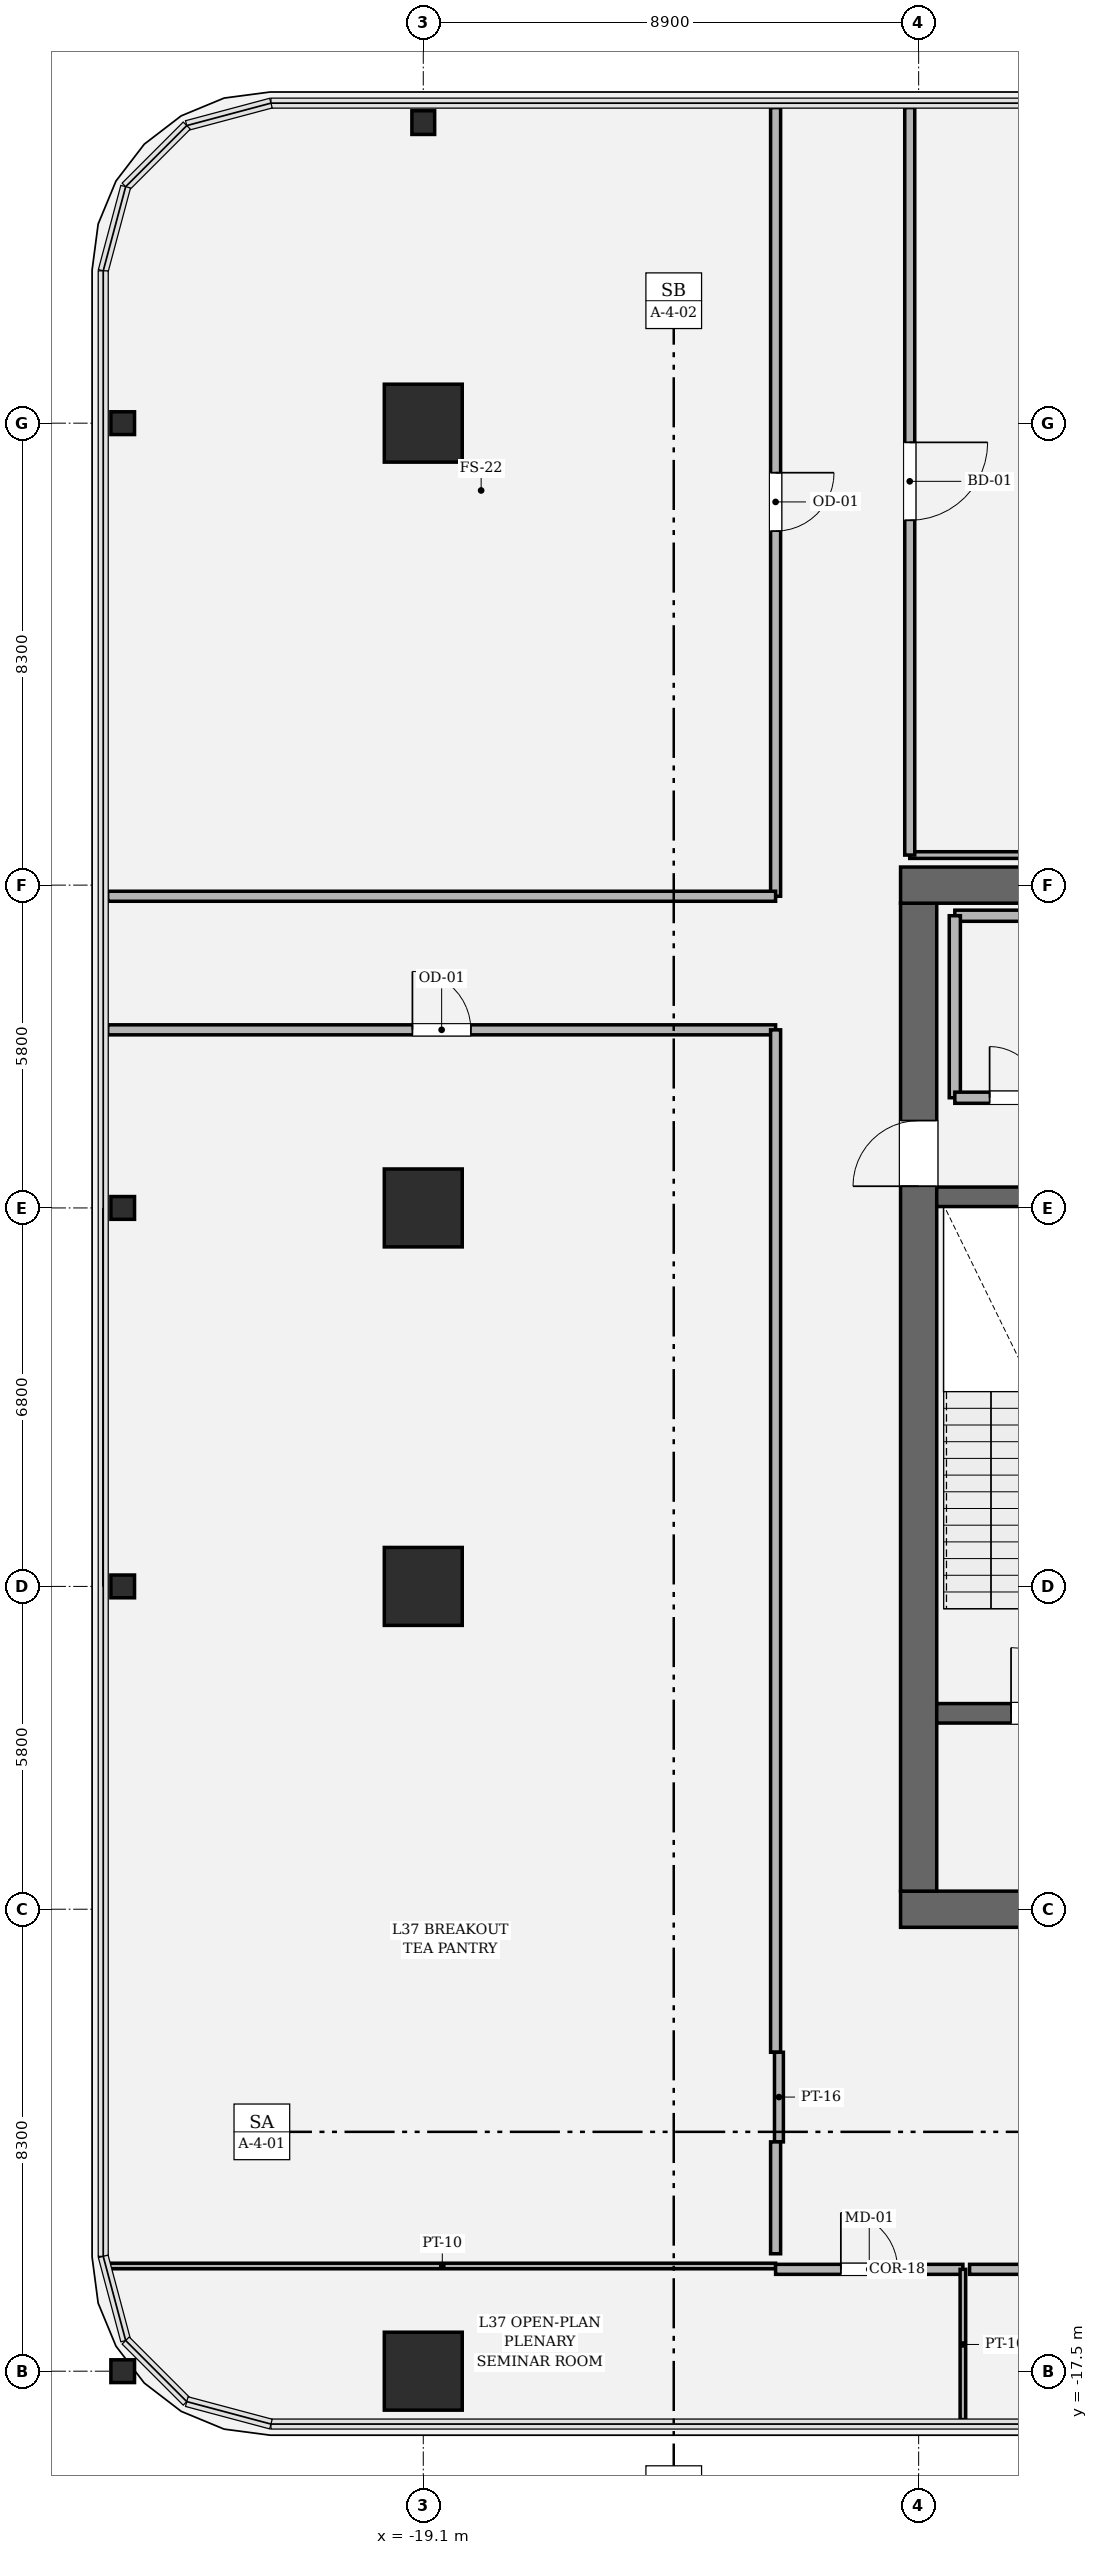
"""IFC4 building model, lengths in metres.
Left out: names, types, materials, properties, quantities, classifications, styles, units other than length and angle.
Written with IfcOpenShell. Run it as: python <this file> out.ifc"""

import sys

from ifc_helpers import new_model, si_unit, direction, frame, frame_2d, origin, origin_2d, place, context, subcontext, project, spatial, rectangle, hollow_rectangle, i_section, extrude, element, fill, save


model = new_model("IFC4")
c1 = context("Model", 3, precision=1e-05, world=origin(), true_north=direction((0.0, 1.0)))
c2 = subcontext(c1, "Body", "Model", "MODEL_VIEW")
j1 = project(units=[si_unit("LENGTHUNIT", "METRE"), si_unit("PLANEANGLEUNIT", "RADIAN")], contexts=[c1])
p1 = place(None, origin())
s1 = spatial("IfcSite", under=j1, at=p1, CompositionType="ELEMENT")
p2 = place(p1, origin())
s2 = spatial("IfcBuilding", under=s1, at=p2, CompositionType="ELEMENT")
p3 = place(p2, frame((0.0, 0.0, 160.05)))
s3 = spatial("IfcBuildingStorey", under=s2, at=p3, CompositionType="ELEMENT", Elevation=160.05)
p4 = place(p3, frame((10.525, -9.2, 0.0), z_axis=(0.0, 0.0, 1.0), x_axis=(-1.0, 0.0, 0.0)))
e1 = element("IfcWall", 1, at=p4, inside=s3, PredefinedType="SHEAR", context=c2, shape_type="SweptSolid", body=[
    extrude(rectangle(XDim=21.05, YDim=0.65, at=frame_2d((10.525, 0.0))), origin(), (0.0, 0.0, 1.0), 4.05),
])
p5 = place(p4, frame((2.8, 0.0, 0.0)))
e2 = element("IfcOpeningElement", 2, at=p5, cuts=e1, PredefinedType="OPENING", context=c2, shape_type="SweptSolid", body=[
    extrude(rectangle(XDim=1.25, YDim=2.25, at=frame_2d((0.625, 1.125))), frame((0.0, 0.335, 0.0), z_axis=(0.0, -1.0, 0.0), x_axis=(1.0, 0.0, 0.0)), (0.0, 0.0, 1.0), 0.67),
])
p6 = place(p4, frame((17.0, 0.0, 0.0)))
e3 = element("IfcOpeningElement", 3, at=p6, cuts=e1, PredefinedType="OPENING", context=c2, shape_type="SweptSolid", body=[
    extrude(rectangle(XDim=1.25, YDim=2.25, at=frame_2d((0.625, 1.125))), frame((0.0, 0.335, 0.0), z_axis=(0.0, -1.0, 0.0), x_axis=(1.0, 0.0, 0.0)), (0.0, 0.0, 1.0), 0.67),
])
p7 = place(p3, frame((-10.2, -8.875, 0.0), z_axis=(0.0, 0.0, 1.0), x_axis=(0.0, 1.0, 0.0)))
e4 = element("IfcWall", 4, at=p7, inside=s3, PredefinedType="SHEAR", context=c2, shape_type="SweptSolid", body=[
    extrude(rectangle(XDim=17.75, YDim=0.65, at=frame_2d((8.875, 0.0))), origin(), (0.0, 0.0, 1.0), 4.05),
])
p8 = place(p7, frame((12.665, 0.0, 0.0)))
e5 = element("IfcOpeningElement", 5, at=p8, cuts=e4, PredefinedType="OPENING", context=c2, shape_type="SweptSolid", body=[
    extrude(rectangle(XDim=1.18, YDim=2.2, at=frame_2d((0.59, 1.1))), frame((0.0, 0.335, 0.0), z_axis=(0.0, -1.0, 0.0), x_axis=(1.0, 0.0, 0.0)), (0.0, 0.0, 1.0), 0.67),
])
p9 = place(p3, frame((-10.525, 9.2, 0.0), z_axis=(0.0, 0.0, 1.0), x_axis=(1.0, 0.0, 0.0)))
e6 = element("IfcWall", 6, at=p9, inside=s3, PredefinedType="SHEAR", context=c2, shape_type="SweptSolid", body=[
    extrude(rectangle(XDim=21.05, YDim=0.65, at=frame_2d((10.525, 0.0))), origin(), (0.0, 0.0, 1.0), 4.05),
])
p10 = place(p3, frame((-9.875, -5.68, 0.0), z_axis=(0.0, 0.0, 1.0), x_axis=(1.0, 0.0, 0.0)))
e7 = element("IfcWall", 7, at=p10, inside=s3, PredefinedType="SOLIDWALL", context=c2, shape_type="SweptSolid", body=[
    extrude(rectangle(XDim=5.225, YDim=0.35, at=frame_2d((2.613, 0.0))), origin(), (0.0, 0.0, 1.0), 4.05),
])
p11 = place(p10, frame((1.335, 0.0, 0.0)))
e8 = element("IfcOpeningElement", 8, at=p11, cuts=e7, PredefinedType="OPENING", context=c2, shape_type="SweptSolid", body=[
    extrude(rectangle(XDim=1.18, YDim=2.2, at=frame_2d((0.59, 1.1))), frame((0.0, 0.185, 0.0), z_axis=(0.0, -1.0, 0.0), x_axis=(1.0, 0.0, 0.0)), (0.0, 0.0, 1.0), 0.37),
])
p12 = place(p3, frame((-9.875, 3.6, 0.0), z_axis=(0.0, 0.0, 1.0), x_axis=(1.0, 0.0, 0.0)))
e9 = element("IfcWall", 9, at=p12, inside=s3, PredefinedType="SOLIDWALL", context=c2, shape_type="SweptSolid", body=[
    extrude(rectangle(XDim=5.225, YDim=0.35, at=frame_2d((2.613, 0.0))), origin(), (0.0, 0.0, 1.0), 4.05),
])
for number, where, z_axis, x_axis in (
    (10, (-19.1, -17.5, 0.0), (0.0, 0.0, 1.0), (1.0, 0.0, 0.0)),
    (11, (-19.1, 17.5, 0.0), (0.0, 0.0, 1.0), (1.0, 0.0, 0.0)),
    (12, (-19.1, 3.4, 0.0), (0.0, 0.0, 1.0), (1.0, 0.0, 0.0)),
    (13, (-19.1, -3.4, 0.0), (0.0, 0.0, 1.0), (1.0, 0.0, 0.0)),
):
    element("IfcColumn", number, at=place(p3, frame(where, z_axis=z_axis, x_axis=x_axis)), inside=s3, PredefinedType="COLUMN", context=c2, shape_type="SweptSolid", body=[
        extrude(hollow_rectangle(XDim=1.4, YDim=1.4, WallThickness=0.042, at=origin_2d()), origin(), (0.0, 0.0, 1.0), 4.05),
    ])
for number, where, z_axis, x_axis in (
    (14, (-19.1, 22.9, 0.0), (0.0, 0.0, 1.0), (1.0, 0.0, 0.0)),
    (15, (-24.5, -17.5, 0.0), (0.0, 0.0, 1.0), (0.0, 1.0, 0.0)),
    (16, (-24.5, -3.4, 0.0), (0.0, 0.0, 1.0), (0.0, 1.0, 0.0)),
    (17, (-24.5, 3.4, 0.0), (0.0, 0.0, 1.0), (0.0, 1.0, 0.0)),
    (18, (-24.5, 17.5, 0.0), (0.0, 0.0, 1.0), (0.0, 1.0, 0.0)),
):
    element("IfcColumn", number, at=place(p3, frame(where, z_axis=z_axis, x_axis=x_axis)), inside=s3, PredefinedType="COLUMN", context=c2, shape_type="SweptSolid", body=[
        extrude(i_section(OverallWidth=0.409, OverallDepth=0.425, WebThickness=0.032, FlangeThickness=0.052, FilletRadius=0.018, at=origin_2d()), origin(), (0.0, 0.0, 1.0), 4.048),
    ])
p13 = place(p3, frame((-7.38, 8.65, 0.0), z_axis=(0.0, 0.0, 1.0), x_axis=(-1.0, 0.0, 0.0)))
e19 = element("IfcWall", 19, at=p13, inside=s3, PredefinedType="SOLIDWALL", context=c2, shape_type="SweptSolid", body=[
    extrude(rectangle(XDim=2.17, YDim=0.2, at=frame_2d((1.085, 0.0))), origin(), (0.0, 0.0, 1.0), 3.83),
])
p14 = place(p3, frame((-9.55, 8.65, 0.0), z_axis=(0.0, 0.0, 1.0), x_axis=(0.0, -1.0, 0.0)))
e20 = element("IfcWall", 20, at=p14, inside=s3, PredefinedType="SOLIDWALL", context=c2, shape_type="SweptSolid", body=[
    extrude(rectangle(XDim=3.27, YDim=0.2, at=frame_2d((1.635, 0.0))), origin(), (0.0, 0.0, 1.0), 3.83),
])
p15 = place(p3, frame((-9.55, 5.38, 0.0), z_axis=(0.0, 0.0, 1.0), x_axis=(1.0, 0.0, 0.0)))
e21 = element("IfcWall", 21, at=p15, inside=s3, PredefinedType="SOLIDWALL", context=c2, shape_type="SweptSolid", body=[
    extrude(rectangle(XDim=2.17, YDim=0.2, at=frame_2d((1.085, 0.0))), origin(), (0.0, 0.0, 1.0), 3.83),
])
p16 = place(p15, frame((0.625, 0.0, 0.0)))
e22 = element("IfcOpeningElement", 22, at=p16, cuts=e21, PredefinedType="OPENING", context=c2, shape_type="SweptSolid", body=[
    extrude(rectangle(XDim=0.92, YDim=2.1, at=frame_2d((0.46, 1.05))), frame((0.0, 0.11, 0.0), z_axis=(0.0, -1.0, 0.0), x_axis=(1.0, 0.0, 0.0)), (0.0, 0.0, 1.0), 0.22),
])
p17 = place(p3, frame((-24.747, -15.61, 0.0), z_axis=(0.0, 0.0, 1.0), x_axis=(1.0, 0.0, 0.0)))
e23 = element("IfcWall", 23, at=p17, inside=s3, PredefinedType="PARTITIONING", context=c2, shape_type="SweptSolid", body=[
    extrude(rectangle(XDim=11.977, YDim=0.1, at=frame_2d((5.988, 0.0))), origin(), (0.0, 0.0, 1.0), 2.544),
])
p18 = place(p3, frame((-12.77, -15.67, 0.0), z_axis=(0.0, 0.0, 1.0), x_axis=(1.0, 0.0, 0.0)))
e24 = element("IfcWall", 24, at=p18, inside=s3, PredefinedType="PARTITIONING", context=c2, shape_type="SweptSolid", body=[
    extrude(rectangle(XDim=3.365, YDim=0.18, at=frame_2d((1.683, 0.0))), origin(), (0.0, 0.0, 1.0), 3.174),
])
p19 = place(p18, frame((1.173, 0.0, 0.0)))
e25 = element("IfcOpeningElement", 25, at=p19, cuts=e24, PredefinedType="OPENING", context=c2, shape_type="SweptSolid", body=[
    extrude(rectangle(XDim=1.02, YDim=2.2, at=frame_2d((0.51, 1.1))), frame((0.0, 0.1, 0.0), z_axis=(0.0, -1.0, 0.0), x_axis=(1.0, 0.0, 0.0)), (0.0, 0.0, 1.0), 0.2),
])
p20 = place(p3, frame((-9.405, -15.67, 0.0), z_axis=(0.0, 0.0, 1.0), x_axis=(0.0, -1.0, 0.0)))
e26 = element("IfcWall", 26, at=p20, inside=s3, PredefinedType="PARTITIONING", context=c2, shape_type="SweptSolid", body=[
    extrude(rectangle(XDim=2.7, YDim=0.1, at=frame_2d((1.35, 0.0))), origin(), (0.0, 0.0, 1.0), 3.174),
])
p21 = place(p3, frame((-9.285, -15.67, 0.0), z_axis=(0.0, 0.0, 1.0), x_axis=(1.0, 0.0, 0.0)))
e27 = element("IfcWall", 27, at=p21, inside=s3, PredefinedType="PARTITIONING", context=c2, shape_type="SweptSolid", body=[
    extrude(rectangle(XDim=16.685, YDim=0.18, at=frame_2d((8.342, 0.0))), origin(), (0.0, 0.0, 1.0), 3.174),
])
p22 = place(p3, frame((-24.77, 6.6, 0.0), z_axis=(0.0, 0.0, 1.0), x_axis=(1.0, 0.0, 0.0)))
e28 = element("IfcWall", 28, at=p22, inside=s3, PredefinedType="PARTITIONING", context=c2, shape_type="SweptSolid", body=[
    extrude(rectangle(XDim=12.0, YDim=0.18, at=frame_2d((6.0, 0.0))), origin(), (0.0, 0.0, 1.0), 2.544),
])
p23 = place(p22, frame((5.475, 0.0, 0.0)))
e29 = element("IfcOpeningElement", 29, at=p23, cuts=e28, PredefinedType="OPENING", context=c2, shape_type="SweptSolid", body=[
    extrude(rectangle(XDim=1.05, YDim=2.2, at=frame_2d((0.525, 1.1))), frame((0.0, 0.1, 0.0), z_axis=(0.0, -1.0, 0.0), x_axis=(1.0, 0.0, 0.0)), (0.0, 0.0, 1.0), 0.2),
])
p24 = place(p3, frame((-12.77, 6.6, 0.0), z_axis=(0.0, 0.0, 1.0), x_axis=(0.0, -1.0, 0.0)))
e30 = element("IfcWall", 30, at=p24, inside=s3, PredefinedType="PARTITIONING", context=c2, shape_type="SweptSolid", body=[
    extrude(rectangle(XDim=18.37, YDim=0.18, at=frame_2d((9.185, 0.0))), origin(), (0.0, 0.0, 1.0), 3.174),
])
p25 = place(p3, frame((-12.71, -11.77, 0.0), z_axis=(0.0, 0.0, 1.0), x_axis=(0.0, -1.0, 0.0)))
e31 = element("IfcWall", 31, at=p25, inside=s3, PredefinedType="PARTITIONING", context=c2, shape_type="SweptSolid", body=[
    extrude(rectangle(XDim=1.61, YDim=0.16, at=frame_2d((0.805, 0.0))), origin(), (0.0, 0.0, 1.0), 3.424),
])
p26 = place(p3, frame((-12.77, -13.38, 0.0), z_axis=(0.0, 0.0, 1.0), x_axis=(0.0, -1.0, 0.0)))
e32 = element("IfcWall", 32, at=p26, inside=s3, PredefinedType="PARTITIONING", context=c2, shape_type="SweptSolid", body=[
    extrude(rectangle(XDim=2.01, YDim=0.18, at=frame_2d((1.005, 0.0))), origin(), (0.0, 0.0, 1.0), 3.424),
])
p27 = place(p3, frame((-12.77, 23.17, 0.0), z_axis=(0.0, 0.0, 1.0), x_axis=(0.0, -1.0, 0.0)))
e33 = element("IfcWall", 33, at=p27, inside=s3, PredefinedType="PARTITIONING", context=c2, shape_type="SweptSolid", body=[
    extrude(rectangle(XDim=14.17, YDim=0.18, at=frame_2d((7.085, 0.0))), origin(), (0.0, 0.0, 1.0), 2.544),
])
p28 = place(p27, frame((6.56, 0.0, 0.0)))
e34 = element("IfcOpeningElement", 34, at=p28, cuts=e33, PredefinedType="OPENING", context=c2, shape_type="SweptSolid", body=[
    extrude(rectangle(XDim=1.05, YDim=2.2, at=frame_2d((0.525, 1.1))), frame((0.0, 0.1, 0.0), z_axis=(0.0, -1.0, 0.0), x_axis=(1.0, 0.0, 0.0)), (0.0, 0.0, 1.0), 0.2),
])
p29 = place(p3, frame((-12.77, 9.0, 0.0), z_axis=(0.0, 0.0, 1.0), x_axis=(-1.0, 0.0, 0.0)))
e35 = element("IfcWall", 35, at=p29, inside=s3, PredefinedType="PARTITIONING", context=c2, shape_type="SweptSolid", body=[
    extrude(rectangle(XDim=12.0, YDim=0.18, at=frame_2d((6.0, 0.0))), origin(), (0.0, 0.0, 1.0), 2.544),
])
p30 = place(p3, frame((2.874, 9.74, 0.0), z_axis=(0.0, 0.0, 1.0), x_axis=(-1.0, 0.0, 0.0)))
e36 = element("IfcWall", 36, at=p30, inside=s3, PredefinedType="PARTITIONING", context=c2, shape_type="SweptSolid", body=[
    extrude(rectangle(XDim=13.234, YDim=0.12, at=frame_2d((6.617, 0.0))), origin(), (0.0, 0.0, 1.0), 3.174),
])
p31 = place(p3, frame((-10.36, 9.74, 0.0), z_axis=(0.0, 0.0, 1.0), x_axis=(0.0, 1.0, 0.0)))
e37 = element("IfcWall", 37, at=p31, inside=s3, PredefinedType="PARTITIONING", context=c2, shape_type="SweptSolid", body=[
    extrude(rectangle(XDim=13.43, YDim=0.18, at=frame_2d((6.715, 0.0))), origin(), (0.0, 0.0, 1.0), 2.544),
])
p32 = place(p31, frame((6.015, 0.0, 0.0)))
e38 = element("IfcOpeningElement", 38, at=p32, cuts=e37, PredefinedType="OPENING", context=c2, shape_type="SweptSolid", body=[
    extrude(rectangle(XDim=1.4, YDim=2.25, at=frame_2d((0.7, 1.125))), frame((0.0, 0.1, 0.0), z_axis=(0.0, -1.0, 0.0), x_axis=(1.0, 0.0, 0.0)), (0.0, 0.0, 1.0), 0.2),
])
p33 = place(p11, origin())
e39 = element("IfcDoor", 39, at=p33, inside=s3, OperationType="SINGLE_SWING_LEFT", PredefinedType="DOOR", context=c2, shape_type="SweptSolid", body=[
    extrude(rectangle(XDim=1.18, YDim=2.2, at=frame_2d((0.59, 1.1))), frame((0.0, 0.025, 0.0), z_axis=(0.0, -1.0, 0.0), x_axis=(1.0, 0.0, 0.0)), (0.0, 0.0, 1.0), 0.05),
])
fill(e8, e39)
p34 = place(p8, origin())
e40 = element("IfcDoor", 40, at=p34, inside=s3, OperationType="SINGLE_SWING_LEFT", PredefinedType="DOOR", context=c2, shape_type="SweptSolid", body=[
    extrude(rectangle(XDim=1.18, YDim=2.2, at=frame_2d((0.59, 1.1))), frame((0.0, 0.025, 0.0), z_axis=(0.0, -1.0, 0.0), x_axis=(1.0, 0.0, 0.0)), (0.0, 0.0, 1.0), 0.05),
])
fill(e5, e40)
p35 = place(p16, origin())
e41 = element("IfcDoor", 41, at=p35, inside=s3, OperationType="SINGLE_SWING_LEFT", PredefinedType="DOOR", context=c2, shape_type="SweptSolid", body=[
    extrude(rectangle(XDim=0.92, YDim=2.1, at=frame_2d((0.46, 1.05))), frame((0.0, 0.025, 0.0), z_axis=(0.0, -1.0, 0.0), x_axis=(1.0, 0.0, 0.0)), (0.0, 0.0, 1.0), 0.05),
])
fill(e22, e41)
p36 = place(p19, origin())
e42 = element("IfcDoor", 42, at=p36, inside=s3, OperationType="SINGLE_SWING_LEFT", PredefinedType="DOOR", context=c2, shape_type="SweptSolid", body=[
    extrude(rectangle(XDim=1.02, YDim=2.2, at=frame_2d((0.51, 1.1))), frame((0.0, 0.025, 0.0), z_axis=(0.0, -1.0, 0.0), x_axis=(1.0, 0.0, 0.0)), (0.0, 0.0, 1.0), 0.05),
])
fill(e25, e42)
p37 = place(p23, origin())
e43 = element("IfcDoor", 43, at=p37, inside=s3, OperationType="SINGLE_SWING_LEFT", PredefinedType="DOOR", context=c2, shape_type="SweptSolid", body=[
    extrude(rectangle(XDim=1.05, YDim=2.2, at=frame_2d((0.525, 1.1))), frame((0.0, 0.025, 0.0), z_axis=(0.0, -1.0, 0.0), x_axis=(1.0, 0.0, 0.0)), (0.0, 0.0, 1.0), 0.05),
])
fill(e29, e43)
p38 = place(p28, origin())
e44 = element("IfcDoor", 44, at=p38, inside=s3, OperationType="SINGLE_SWING_LEFT", PredefinedType="DOOR", context=c2, shape_type="SweptSolid", body=[
    extrude(rectangle(XDim=1.05, YDim=2.2, at=frame_2d((0.525, 1.1))), frame((0.0, 0.025, 0.0), z_axis=(0.0, -1.0, 0.0), x_axis=(1.0, 0.0, 0.0)), (0.0, 0.0, 1.0), 0.05),
])
fill(e34, e44)
p39 = place(p32, origin())
e45 = element("IfcDoor", 45, at=p39, inside=s3, OperationType="SINGLE_SWING_RIGHT", PredefinedType="DOOR", context=c2, shape_type="SweptSolid", body=[
    extrude(rectangle(XDim=1.4, YDim=2.25, at=frame_2d((0.7, 1.125))), frame((0.0, 0.025, 0.0), z_axis=(0.0, -1.0, 0.0), x_axis=(1.0, 0.0, 0.0)), (0.0, 0.0, 1.0), 0.05),
])
fill(e38, e45)
save(model, sys.argv[1])
